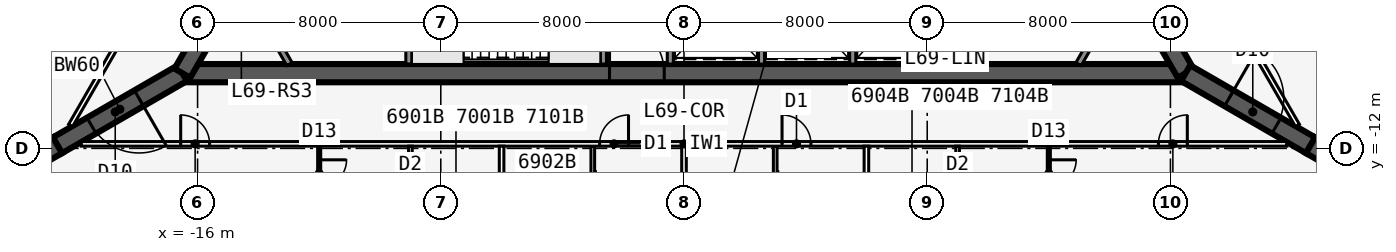
"""IFC4 building model, lengths in metres.
Left out: names, types, materials, properties, quantities, classifications, styles, units other than length and angle.
Written with IfcOpenShell. Run it as: python <this file> out.ifc"""

import sys

from ifc_helpers import new_model, si_unit, direction, frame, frame_2d, origin, place, context, subcontext, project, spatial, polyline, rectangle, outline, extrude, element, fill, save


model = new_model("IFC4")
c1 = context("Model", 3, precision=1e-05, world=origin(), true_north=direction((0.0, 1.0)))
c2 = subcontext(c1, "Body", "Model", "MODEL_VIEW")
j1 = project(units=[si_unit("LENGTHUNIT", "METRE"), si_unit("PLANEANGLEUNIT", "RADIAN")], contexts=[c1])
p1 = place(None, origin())
s1 = spatial("IfcSite", under=j1, at=p1, CompositionType="ELEMENT")
p2 = place(p1, origin())
s2 = spatial("IfcBuilding", under=s1, at=p2, CompositionType="ELEMENT")
p3 = place(p2, frame((0.0, 0.0, 260.9)))
s3 = spatial("IfcBuildingStorey", under=s2, at=p3, CompositionType="ELEMENT", Elevation=260.9)
p4 = place(p3, frame((-16.5, -9.526, 0.0), z_axis=(0.0, 0.0, 1.0), x_axis=(1.0, 0.0, 0.0)))
e1 = element("IfcWall", 1, at=p4, inside=s3, PredefinedType="SHEAR", context=c2, shape_type="SweptSolid", body=[
    extrude(rectangle(XDim=33.0, YDim=0.6, at=frame_2d((16.5, 0.0))), origin(), (0.0, 0.0, 1.0), 3.6),
])
p5 = place(p4, frame((14.05, 0.0, 0.0)))
e2 = element("IfcOpeningElement", 2, at=p5, cuts=e1, PredefinedType="OPENING", context=c2, shape_type="SweptSolid", body=[
    extrude(rectangle(XDim=1.8, YDim=2.13, at=frame_2d((0.9, 1.065))), frame((0.0, 0.31, 0.0), z_axis=(0.0, -1.0, 0.0), x_axis=(1.0, 0.0, 0.0)), (0.0, 0.0, 1.0), 0.62),
])
p6 = place(p3, frame((-9.05, -5.951, 0.0), z_axis=(0.0, 0.0, 1.0), x_axis=(0.0, -1.0, 0.0)))
e3 = element("IfcWall", 3, at=p6, inside=s3, PredefinedType="SOLIDWALL", context=c2, shape_type="SweptSolid", body=[
    extrude(rectangle(XDim=3.275, YDim=0.2, at=frame_2d((1.637, 0.0))), origin(), (0.0, 0.0, 1.0), 3.435),
])
p7 = place(p3, frame((-2.65, -5.951, 0.0), z_axis=(0.0, 0.0, 1.0), x_axis=(0.0, -1.0, 0.0)))
e4 = element("IfcWall", 4, at=p7, inside=s3, PredefinedType="SOLIDWALL", context=c2, shape_type="SweptSolid", body=[
    extrude(rectangle(XDim=3.275, YDim=0.2, at=frame_2d((1.637, 0.0))), origin(), (0.0, 0.0, 1.0), 3.435),
])
p8 = place(p7, frame((1.675, 0.0, 0.0)))
e5 = element("IfcOpeningElement", 5, at=p8, cuts=e4, PredefinedType="OPENING", context=c2, shape_type="SweptSolid", body=[
    extrude(rectangle(XDim=1.0, YDim=2.13, at=frame_2d((0.5, 1.065))), frame((0.0, 0.11, 0.0), z_axis=(0.0, -1.0, 0.0), x_axis=(1.0, 0.0, 0.0)), (0.0, 0.0, 1.0), 0.22),
])
for number, where, z_axis, x_axis in (
    (6, (-0.45, -5.951, 0.0), (0.0, 0.0, 1.0), (0.0, -1.0, 0.0)),
    (7, (2.55, -5.951, 0.0), (0.0, 0.0, 1.0), (0.0, -1.0, 0.0)),
    (8, (5.55, -5.951, 0.0), (0.0, 0.0, 1.0), (0.0, -1.0, 0.0)),
    (9, (8.45, -5.951, 0.0), (0.0, 0.0, 1.0), (0.0, -1.0, 0.0)),
):
    element("IfcWall", number, at=place(p3, frame(where, z_axis=z_axis, x_axis=x_axis)), inside=s3, PredefinedType="SOLIDWALL", context=c2, shape_type="SweptSolid", body=[
        extrude(rectangle(XDim=3.275, YDim=0.2, at=frame_2d((1.637, 0.0))), origin(), (0.0, 0.0, 1.0), 3.435),
    ])
p9 = place(p3, frame((16.5, -9.526, 0.0), z_axis=(0.0, 0.0, 1.0), x_axis=(-0.499999749417, 0.866025548458, 0.0)))
e10 = element("IfcWall", 10, at=p9, inside=s3, PredefinedType="SHEAR", context=c2, shape_type="SweptSolid", body=[
    extrude(rectangle(XDim=33.0, YDim=0.6, at=frame_2d((16.5, 0.0))), origin(), (0.0, 0.0, 1.0), 3.6),
])
p10 = place(p9, frame((14.15, 0.0, 0.0)))
e11 = element("IfcOpeningElement", 11, at=p10, cuts=e10, PredefinedType="OPENING", context=c2, shape_type="SweptSolid", body=[
    extrude(rectangle(XDim=1.8, YDim=2.13, at=frame_2d((0.9, 1.065))), frame((0.0, 0.31, 0.0), z_axis=(0.0, -1.0, 0.0), x_axis=(1.0, 0.0, 0.0)), (0.0, 0.0, 1.0), 0.62),
])
p11 = place(p9, frame((12.6, 0.0, 0.0)))
e12 = element("IfcOpeningElement", 12, at=p11, cuts=e10, PredefinedType="OPENING", context=c2, shape_type="SweptSolid", body=[
    extrude(rectangle(XDim=1.0, YDim=2.13, at=frame_2d((0.5, 1.065))), frame((0.0, 0.31, 0.0), z_axis=(0.0, -1.0, 0.0), x_axis=(1.0, 0.0, 0.0)), (0.0, 0.0, 1.0), 0.62),
])
p12 = place(p3, frame((0.0, 19.052, 0.0), z_axis=(0.0, 0.0, 1.0), x_axis=(-0.499999749417, -0.866025548458, 0.0)))
e13 = element("IfcWall", 13, at=p12, inside=s3, PredefinedType="SHEAR", context=c2, shape_type="SweptSolid", body=[
    extrude(rectangle(XDim=33.0, YDim=0.6, at=frame_2d((16.5, 0.0))), origin(), (0.0, 0.0, 1.0), 3.6),
])
p13 = place(p12, frame((14.15, 0.0, 0.0)))
e14 = element("IfcOpeningElement", 14, at=p13, cuts=e13, PredefinedType="OPENING", context=c2, shape_type="SweptSolid", body=[
    extrude(rectangle(XDim=1.8, YDim=2.13, at=frame_2d((0.9, 1.065))), frame((0.0, 0.31, 0.0), z_axis=(0.0, -1.0, 0.0), x_axis=(1.0, 0.0, 0.0)), (0.0, 0.0, 1.0), 0.62),
])
p14 = place(p12, frame((12.6, 0.0, 0.0)))
e15 = element("IfcOpeningElement", 15, at=p14, cuts=e13, PredefinedType="OPENING", context=c2, shape_type="SweptSolid", body=[
    extrude(rectangle(XDim=1.0, YDim=2.13, at=frame_2d((0.5, 1.065))), frame((0.0, 0.31, 0.0), z_axis=(0.0, -1.0, 0.0), x_axis=(1.0, 0.0, 0.0)), (0.0, 0.0, 1.0), 0.62),
])
p15 = place(p3, frame((16.5, -9.526, 0.0), z_axis=(0.0, 0.0, 1.0), x_axis=(0.866031398331, -0.499989616998, 0.0)))
e16 = element("IfcWall", 16, at=p15, inside=s3, PredefinedType="SHEAR", context=c2, shape_type="SweptSolid", body=[
    extrude(rectangle(XDim=4.746, YDim=0.6, at=frame_2d((2.373, 0.0))), origin(), (0.0, 0.0, 1.0), 3.6),
])
p16 = place(p15, frame((1.65, 0.0, 0.0)))
e17 = element("IfcOpeningElement", 17, at=p16, cuts=e16, PredefinedType="OPENING", context=c2, shape_type="SweptSolid", body=[
    extrude(rectangle(XDim=1.8, YDim=2.13, at=frame_2d((0.9, 1.065))), frame((0.0, 0.31, 0.0), z_axis=(0.0, -1.0, 0.0), x_axis=(1.0, 0.0, 0.0)), (0.0, 0.0, 1.0), 0.62),
])
p17 = place(p3, frame((20.61, -11.899, 0.0), z_axis=(0.0, 0.0, 1.0), x_axis=(0.866009537788, -0.500027479704, 0.0)))
e18 = element("IfcWall", 18, at=p17, inside=s3, PredefinedType="SHEAR", context=c2, shape_type="SweptSolid", body=[
    extrude(rectangle(XDim=1.155, YDim=0.6, at=frame_2d((0.577, 0.0))), origin(), (0.0, 0.0, 1.0), 3.6),
])
p18 = place(p3, frame((-16.5, -9.526, 0.0), z_axis=(0.0, 0.0, 1.0), x_axis=(-0.866031398331, -0.499989616998, 0.0)))
e19 = element("IfcWall", 19, at=p18, inside=s3, PredefinedType="SHEAR", context=c2, shape_type="SweptSolid", body=[
    extrude(rectangle(XDim=4.746, YDim=0.6, at=frame_2d((2.373, 0.0))), origin(), (0.0, 0.0, 1.0), 3.6),
])
p19 = place(p18, frame((1.65, 0.0, 0.0)))
e20 = element("IfcOpeningElement", 20, at=p19, cuts=e19, PredefinedType="OPENING", context=c2, shape_type="SweptSolid", body=[
    extrude(rectangle(XDim=1.8, YDim=2.13, at=frame_2d((0.9, 1.065))), frame((0.0, 0.31, 0.0), z_axis=(0.0, -1.0, 0.0), x_axis=(1.0, 0.0, 0.0)), (0.0, 0.0, 1.0), 0.62),
])
p20 = place(p3, frame((-20.61, -11.899, 0.0), z_axis=(0.0, 0.0, 1.0), x_axis=(-0.866009537788, -0.500027479704, 0.0)))
e21 = element("IfcWall", 21, at=p20, inside=s3, PredefinedType="SHEAR", context=c2, shape_type="SweptSolid", body=[
    extrude(rectangle(XDim=1.155, YDim=0.6, at=frame_2d((0.577, 0.0))), origin(), (0.0, 0.0, 1.0), 3.6),
])
p21 = place(p3, frame((18.46, -15.924, 0.0), z_axis=(0.0, 0.0, 1.0), x_axis=(0.707081252484, 0.707132308968, 0.0)))
e22 = element("IfcWall", 22, at=p21, inside=s3, PredefinedType="SOLIDWALL", context=c2, shape_type="SweptSolid", body=[
    extrude(outline(polyline([(4.782, 0.225), (4.723, 0.225), (4.375, 0.132), (4.351, 0.225), (0.0, 0.225), (0.0, -0.225), (4.782, -0.225), (4.782, 0.225)])), origin(), (0.0, 0.0, 1.0), 3.435),
])
p22 = place(p21, frame((0.75, 0.0, 0.45)))
e23 = element("IfcOpeningElement", 23, at=p22, cuts=e22, PredefinedType="OPENING", context=c2, shape_type="SweptSolid", body=[
    extrude(rectangle(XDim=3.0, YDim=2.6, at=frame_2d((1.5, 1.3))), frame((0.0, 0.235, 0.0), z_axis=(0.0, -1.0, 0.0), x_axis=(1.0, 0.0, 0.0)), (0.0, 0.0, 1.0), 0.47),
])
p23 = place(p3, frame((-21.841, -12.542, 0.0), z_axis=(0.0, 0.0, 1.0), x_axis=(0.707081252484, -0.707132308968, 0.0)))
e24 = element("IfcWall", 24, at=p23, inside=s3, PredefinedType="SOLIDWALL", context=c2, shape_type="SweptSolid", body=[
    extrude(outline(polyline([(4.782, 0.225), (0.431, 0.225), (0.406, 0.132), (0.059, 0.225), (0.0, 0.225), (0.0, -0.225), (4.782, -0.225), (4.782, 0.225)])), origin(), (0.0, 0.0, 1.0), 3.435),
])
p24 = place(p23, frame((1.031, 0.0, 0.45)))
e25 = element("IfcOpeningElement", 25, at=p24, cuts=e24, PredefinedType="OPENING", context=c2, shape_type="SweptSolid", body=[
    extrude(rectangle(XDim=3.0, YDim=2.6, at=frame_2d((1.5, 1.3))), frame((0.0, 0.235, 0.0), z_axis=(0.0, -1.0, 0.0), x_axis=(1.0, 0.0, 0.0)), (0.0, 0.0, 1.0), 0.47),
])
p25 = place(p3, frame((-19.827, -11.851, 0.0), z_axis=(0.0, 0.0, 1.0), x_axis=(1.0, 0.0, 0.0)))
e26 = element("IfcWall", 26, at=p25, inside=s3, PredefinedType="PARTITIONING", context=c2, shape_type="SweptSolid", body=[
    extrude(rectangle(XDim=39.654, YDim=0.15, at=frame_2d((19.827, 0.0))), origin(), (0.0, 0.0, 1.0), 3.435),
])
p26 = place(p25, frame((3.272, 0.0, 0.0)))
e27 = element("IfcOpeningElement", 27, at=p26, cuts=e26, PredefinedType="OPENING", context=c2, shape_type="SweptSolid", body=[
    extrude(rectangle(XDim=0.95, YDim=2.13, at=frame_2d((0.475, 1.065))), frame((0.0, 0.085, 0.0), z_axis=(0.0, -1.0, 0.0), x_axis=(1.0, 0.0, 0.0)), (0.0, 0.0, 1.0), 0.17),
])
p27 = place(p25, frame((17.052, 0.0, 0.0)))
e28 = element("IfcOpeningElement", 28, at=p27, cuts=e26, PredefinedType="OPENING", context=c2, shape_type="SweptSolid", body=[
    extrude(rectangle(XDim=0.95, YDim=2.13, at=frame_2d((0.475, 1.065))), frame((0.0, 0.085, 0.0), z_axis=(0.0, -1.0, 0.0), x_axis=(1.0, 0.0, 0.0)), (0.0, 0.0, 1.0), 0.17),
])
p28 = place(p25, frame((23.052, 0.0, 0.0)))
e29 = element("IfcOpeningElement", 29, at=p28, cuts=e26, PredefinedType="OPENING", context=c2, shape_type="SweptSolid", body=[
    extrude(rectangle(XDim=0.95, YDim=2.13, at=frame_2d((0.475, 1.065))), frame((0.0, 0.085, 0.0), z_axis=(0.0, -1.0, 0.0), x_axis=(1.0, 0.0, 0.0)), (0.0, 0.0, 1.0), 0.17),
])
p29 = place(p25, frame((35.432, 0.0, 0.0)))
e30 = element("IfcOpeningElement", 30, at=p29, cuts=e26, PredefinedType="OPENING", context=c2, shape_type="SweptSolid", body=[
    extrude(rectangle(XDim=0.95, YDim=2.13, at=frame_2d((0.475, 1.065))), frame((0.0, 0.085, 0.0), z_axis=(0.0, -1.0, 0.0), x_axis=(1.0, 0.0, 0.0)), (0.0, 0.0, 1.0), 0.17),
])
p30 = place(p3, frame((-12.0, -11.926, 0.0), z_axis=(0.0, 0.0, 1.0), x_axis=(0.0, -1.0, 0.0)))
e31 = element("IfcWall", 31, at=p30, inside=s3, PredefinedType="PARTITIONING", context=c2, shape_type="SweptSolid", body=[
    extrude(rectangle(XDim=5.559, YDim=0.1, at=frame_2d((2.779, 0.0))), origin(), (0.0, 0.0, 1.0), 2.823),
])
p31 = place(p30, frame((0.45, 0.0, 0.0)))
e32 = element("IfcOpeningElement", 32, at=p31, cuts=e31, PredefinedType="OPENING", context=c2, shape_type="SweptSolid", body=[
    extrude(rectangle(XDim=0.9, YDim=2.13, at=frame_2d((0.45, 1.065))), frame((0.0, 0.06, 0.0), z_axis=(0.0, -1.0, 0.0), x_axis=(1.0, 0.0, 0.0)), (0.0, 0.0, 1.0), 0.12),
])
p32 = place(p3, frame((-6.0, -11.926, 0.0), z_axis=(0.0, 0.0, 1.0), x_axis=(0.0, -1.0, 0.0)))
e33 = element("IfcWall", 33, at=p32, inside=s3, PredefinedType="PARTITIONING", context=c2, shape_type="SweptSolid", body=[
    extrude(rectangle(XDim=6.732, YDim=0.15, at=frame_2d((3.366, 0.0))), origin(), (0.0, 0.0, 1.0), 3.435),
])
p33 = place(p3, frame((0.0, -11.926, 0.0), z_axis=(0.0, 0.0, 1.0), x_axis=(0.0, -1.0, 0.0)))
e34 = element("IfcWall", 34, at=p33, inside=s3, PredefinedType="PARTITIONING", context=c2, shape_type="SweptSolid", body=[
    extrude(rectangle(XDim=6.854, YDim=0.15, at=frame_2d((3.427, 0.0))), origin(), (0.0, 0.0, 1.0), 2.678),
])
p34 = place(p3, frame((6.0, -11.926, 0.0), z_axis=(0.0, 0.0, 1.0), x_axis=(0.0, -1.0, 0.0)))
e35 = element("IfcWall", 35, at=p34, inside=s3, PredefinedType="PARTITIONING", context=c2, shape_type="SweptSolid", body=[
    extrude(rectangle(XDim=6.732, YDim=0.15, at=frame_2d((3.366, 0.0))), origin(), (0.0, 0.0, 1.0), 3.435),
])
p35 = place(p3, frame((12.0, -11.926, 0.0), z_axis=(0.0, 0.0, 1.0), x_axis=(0.0, -1.0, 0.0)))
e36 = element("IfcWall", 36, at=p35, inside=s3, PredefinedType="PARTITIONING", context=c2, shape_type="SweptSolid", body=[
    extrude(rectangle(XDim=5.559, YDim=0.1, at=frame_2d((2.779, 0.0))), origin(), (0.0, 0.0, 1.0), 2.823),
])
p36 = place(p35, frame((0.45, 0.0, 0.0)))
e37 = element("IfcOpeningElement", 37, at=p36, cuts=e36, PredefinedType="OPENING", context=c2, shape_type="SweptSolid", body=[
    extrude(rectangle(XDim=0.9, YDim=2.13, at=frame_2d((0.45, 1.065))), frame((0.0, 0.06, 0.0), z_axis=(0.0, -1.0, 0.0), x_axis=(1.0, 0.0, 0.0)), (0.0, 0.0, 1.0), 0.12),
])
p37 = place(p3, frame((-9.0, -11.926, 0.0), z_axis=(0.0, 0.0, 1.0), x_axis=(0.0, -1.0, 0.0)))
e38 = element("IfcWall", 38, at=p37, inside=s3, PredefinedType="PLUMBINGWALL", context=c2, shape_type="SweptSolid", body=[
    extrude(rectangle(XDim=2.74, YDim=0.12, at=frame_2d((1.37, 0.0))), origin(), (0.0, 0.0, 1.0), 3.435),
])
p38 = place(p37, frame((1.55, 0.0, 0.0)))
e39 = element("IfcOpeningElement", 39, at=p38, cuts=e38, PredefinedType="OPENING", context=c2, shape_type="SweptSolid", body=[
    extrude(rectangle(XDim=0.9, YDim=2.13, at=frame_2d((0.45, 1.065))), frame((0.0, 0.07, 0.0), z_axis=(0.0, -1.0, 0.0), x_axis=(1.0, 0.0, 0.0)), (0.0, 0.0, 1.0), 0.14),
])
p39 = place(p3, frame((-3.0, -11.926, 0.0), z_axis=(0.0, 0.0, 1.0), x_axis=(0.0, -1.0, 0.0)))
e40 = element("IfcWall", 40, at=p39, inside=s3, PredefinedType="PLUMBINGWALL", context=c2, shape_type="SweptSolid", body=[
    extrude(rectangle(XDim=2.74, YDim=0.12, at=frame_2d((1.37, 0.0))), origin(), (0.0, 0.0, 1.0), 3.435),
])
p40 = place(p39, frame((1.55, 0.0, 0.0)))
e41 = element("IfcOpeningElement", 41, at=p40, cuts=e40, PredefinedType="OPENING", context=c2, shape_type="SweptSolid", body=[
    extrude(rectangle(XDim=0.9, YDim=2.13, at=frame_2d((0.45, 1.065))), frame((0.0, 0.07, 0.0), z_axis=(0.0, -1.0, 0.0), x_axis=(1.0, 0.0, 0.0)), (0.0, 0.0, 1.0), 0.14),
])
p41 = place(p3, frame((3.0, -11.926, 0.0), z_axis=(0.0, 0.0, 1.0), x_axis=(0.0, -1.0, 0.0)))
e42 = element("IfcWall", 42, at=p41, inside=s3, PredefinedType="PLUMBINGWALL", context=c2, shape_type="SweptSolid", body=[
    extrude(rectangle(XDim=2.74, YDim=0.12, at=frame_2d((1.37, 0.0))), origin(), (0.0, 0.0, 1.0), 3.435),
])
p42 = place(p41, frame((1.55, 0.0, 0.0)))
e43 = element("IfcOpeningElement", 43, at=p42, cuts=e42, PredefinedType="OPENING", context=c2, shape_type="SweptSolid", body=[
    extrude(rectangle(XDim=0.9, YDim=2.13, at=frame_2d((0.45, 1.065))), frame((0.0, 0.07, 0.0), z_axis=(0.0, -1.0, 0.0), x_axis=(1.0, 0.0, 0.0)), (0.0, 0.0, 1.0), 0.14),
])
p43 = place(p3, frame((9.0, -11.926, 0.0), z_axis=(0.0, 0.0, 1.0), x_axis=(0.0, -1.0, 0.0)))
e44 = element("IfcWall", 44, at=p43, inside=s3, PredefinedType="PLUMBINGWALL", context=c2, shape_type="SweptSolid", body=[
    extrude(rectangle(XDim=2.74, YDim=0.12, at=frame_2d((1.37, 0.0))), origin(), (0.0, 0.0, 1.0), 3.435),
])
p44 = place(p43, frame((1.55, 0.0, 0.0)))
e45 = element("IfcOpeningElement", 45, at=p44, cuts=e44, PredefinedType="OPENING", context=c2, shape_type="SweptSolid", body=[
    extrude(rectangle(XDim=0.9, YDim=2.13, at=frame_2d((0.45, 1.065))), frame((0.0, 0.07, 0.0), z_axis=(0.0, -1.0, 0.0), x_axis=(1.0, 0.0, 0.0)), (0.0, 0.0, 1.0), 0.14),
])
p45 = place(p3, frame((20.177, -11.245, 0.0), z_axis=(0.0, 0.0, 1.0), x_axis=(-0.499998875317, 0.866026053119, 0.0)))
e46 = element("IfcWall", 46, at=p45, inside=s3, PredefinedType="PARTITIONING", context=c2, shape_type="SweptSolid", body=[
    extrude(rectangle(XDim=39.654, YDim=0.15, at=frame_2d((19.827, 0.0))), origin(), (0.0, 0.0, 1.0), 3.435),
])
p46 = place(p45, frame((10.352, 0.0, 0.0)))
e47 = element("IfcOpeningElement", 47, at=p46, cuts=e46, PredefinedType="OPENING", context=c2, shape_type="SweptSolid", body=[
    extrude(rectangle(XDim=0.95, YDim=2.13, at=frame_2d((0.475, 1.065))), frame((0.0, 0.085, 0.0), z_axis=(0.0, -1.0, 0.0), x_axis=(1.0, 0.0, 0.0)), (0.0, 0.0, 1.0), 0.17),
])
p47 = place(p3, frame((-13.263, 0.729, 0.0), z_axis=(0.0, 0.0, 1.0), x_axis=(-0.500001642027, -0.866024455758, 0.0)))
e48 = element("IfcWall", 48, at=p47, inside=s3, PredefinedType="PARTITIONING", context=c2, shape_type="SweptSolid", body=[
    extrude(rectangle(XDim=13.827, YDim=0.15, at=frame_2d((6.914, 0.0))), origin(), (0.0, 0.0, 1.0), 3.435),
])
p48 = place(p47, frame((3.225, 0.0, 0.0)))
e49 = element("IfcOpeningElement", 49, at=p48, cuts=e48, PredefinedType="OPENING", context=c2, shape_type="SweptSolid", body=[
    extrude(rectangle(XDim=0.95, YDim=2.13, at=frame_2d((0.475, 1.065))), frame((0.0, 0.085, 0.0), z_axis=(0.0, -1.0, 0.0), x_axis=(1.0, 0.0, 0.0)), (0.0, 0.0, 1.0), 0.17),
])
p49 = place(p47, frame((9.225, 0.0, 0.0)))
e50 = element("IfcOpeningElement", 50, at=p49, cuts=e48, PredefinedType="OPENING", context=c2, shape_type="SweptSolid", body=[
    extrude(rectangle(XDim=0.95, YDim=2.13, at=frame_2d((0.475, 1.065))), frame((0.0, 0.085, 0.0), z_axis=(0.0, -1.0, 0.0), x_axis=(1.0, 0.0, 0.0)), (0.0, 0.0, 1.0), 0.17),
])
for number, where, z_axis, x_axis in (
    (51, (14.479, -6.626, 0.0), (0.0, 0.0, 1.0), (-0.5, -0.866, 0.0)),
    (52, (-12.978, -9.226, 0.0), (0.0, 0.0, 1.0), (-0.5, 0.866, 0.0)),
):
    element("IfcWall", number, at=place(p3, frame(where, z_axis=z_axis, x_axis=x_axis)), inside=s3, PredefinedType="SOLIDWALL", context=c2, shape_type="SweptSolid", body=[
        extrude(rectangle(XDim=3.002, YDim=0.2, at=frame_2d((1.501, 0.0))), origin(), (0.0, 0.0, 1.0), 3.435),
    ])
p50 = place(p31, origin())
e53 = element("IfcDoor", 53, at=p50, inside=s3, OperationType="SINGLE_SWING_LEFT", PredefinedType="DOOR", context=c2, shape_type="SweptSolid", body=[
    extrude(rectangle(XDim=0.9, YDim=2.13, at=frame_2d((0.45, 1.065))), frame((0.0, 0.025, 0.0), z_axis=(0.0, -1.0, 0.0), x_axis=(1.0, 0.0, 0.0)), (0.0, 0.0, 1.0), 0.05),
])
fill(e32, e53)
p51 = place(p36, origin())
e54 = element("IfcDoor", 54, at=p51, inside=s3, OperationType="SINGLE_SWING_LEFT", PredefinedType="DOOR", context=c2, shape_type="SweptSolid", body=[
    extrude(rectangle(XDim=0.9, YDim=2.13, at=frame_2d((0.45, 1.065))), frame((0.0, 0.025, 0.0), z_axis=(0.0, -1.0, 0.0), x_axis=(1.0, 0.0, 0.0)), (0.0, 0.0, 1.0), 0.05),
])
fill(e37, e54)
p52 = place(p26, origin())
e55 = element("IfcDoor", 55, at=p52, inside=s3, OperationType="SINGLE_SWING_LEFT", PredefinedType="DOOR", context=c2, shape_type="SweptSolid", body=[
    extrude(rectangle(XDim=0.95, YDim=2.13, at=frame_2d((0.475, 1.065))), frame((0.0, 0.025, 0.0), z_axis=(0.0, -1.0, 0.0), x_axis=(1.0, 0.0, 0.0)), (0.0, 0.0, 1.0), 0.05),
])
fill(e27, e55)
p53 = place(p27, origin())
e56 = element("IfcDoor", 56, at=p53, inside=s3, OperationType="SINGLE_SWING_RIGHT", PredefinedType="DOOR", context=c2, shape_type="SweptSolid", body=[
    extrude(rectangle(XDim=0.95, YDim=2.13, at=frame_2d((0.475, 1.065))), frame((0.0, 0.025, 0.0), z_axis=(0.0, -1.0, 0.0), x_axis=(1.0, 0.0, 0.0)), (0.0, 0.0, 1.0), 0.05),
])
fill(e28, e56)
p54 = place(p28, origin())
e57 = element("IfcDoor", 57, at=p54, inside=s3, OperationType="SINGLE_SWING_LEFT", PredefinedType="DOOR", context=c2, shape_type="SweptSolid", body=[
    extrude(rectangle(XDim=0.95, YDim=2.13, at=frame_2d((0.475, 1.065))), frame((0.0, 0.025, 0.0), z_axis=(0.0, -1.0, 0.0), x_axis=(1.0, 0.0, 0.0)), (0.0, 0.0, 1.0), 0.05),
])
fill(e29, e57)
p55 = place(p29, origin())
e58 = element("IfcDoor", 58, at=p55, inside=s3, OperationType="SINGLE_SWING_RIGHT", PredefinedType="DOOR", context=c2, shape_type="SweptSolid", body=[
    extrude(rectangle(XDim=0.95, YDim=2.13, at=frame_2d((0.475, 1.065))), frame((0.0, 0.025, 0.0), z_axis=(0.0, -1.0, 0.0), x_axis=(1.0, 0.0, 0.0)), (0.0, 0.0, 1.0), 0.05),
])
fill(e30, e58)
p56 = place(p5, origin())
e59 = element("IfcDoor", 59, at=p56, inside=s3, OperationType="DOUBLE_DOOR_SINGLE_SWING", PredefinedType="DOOR", context=c2, shape_type="SweptSolid", body=[
    extrude(rectangle(XDim=1.8, YDim=2.13, at=frame_2d((0.9, 1.065))), frame((0.0, 0.025, 0.0), z_axis=(0.0, -1.0, 0.0), x_axis=(1.0, 0.0, 0.0)), (0.0, 0.0, 1.0), 0.05),
])
fill(e2, e59)
p57 = place(p16, origin())
e60 = element("IfcDoor", 60, at=p57, inside=s3, OperationType="DOUBLE_DOOR_DOUBLE_SWING", PredefinedType="DOOR", context=c2, shape_type="SweptSolid", body=[
    extrude(rectangle(XDim=1.8, YDim=2.13, at=frame_2d((0.9, 1.065))), frame((0.0, 0.025, 0.0), z_axis=(0.0, -1.0, 0.0), x_axis=(1.0, 0.0, 0.0)), (0.0, 0.0, 1.0), 0.05),
])
fill(e17, e60)
p58 = place(p19, origin())
e61 = element("IfcDoor", 61, at=p58, inside=s3, OperationType="DOUBLE_DOOR_DOUBLE_SWING", PredefinedType="DOOR", context=c2, shape_type="SweptSolid", body=[
    extrude(rectangle(XDim=1.8, YDim=2.13, at=frame_2d((0.9, 1.065))), frame((0.0, 0.025, 0.0), z_axis=(0.0, -1.0, 0.0), x_axis=(1.0, 0.0, 0.0)), (0.0, 0.0, 1.0), 0.05),
])
fill(e20, e61)
save(model, sys.argv[1])
